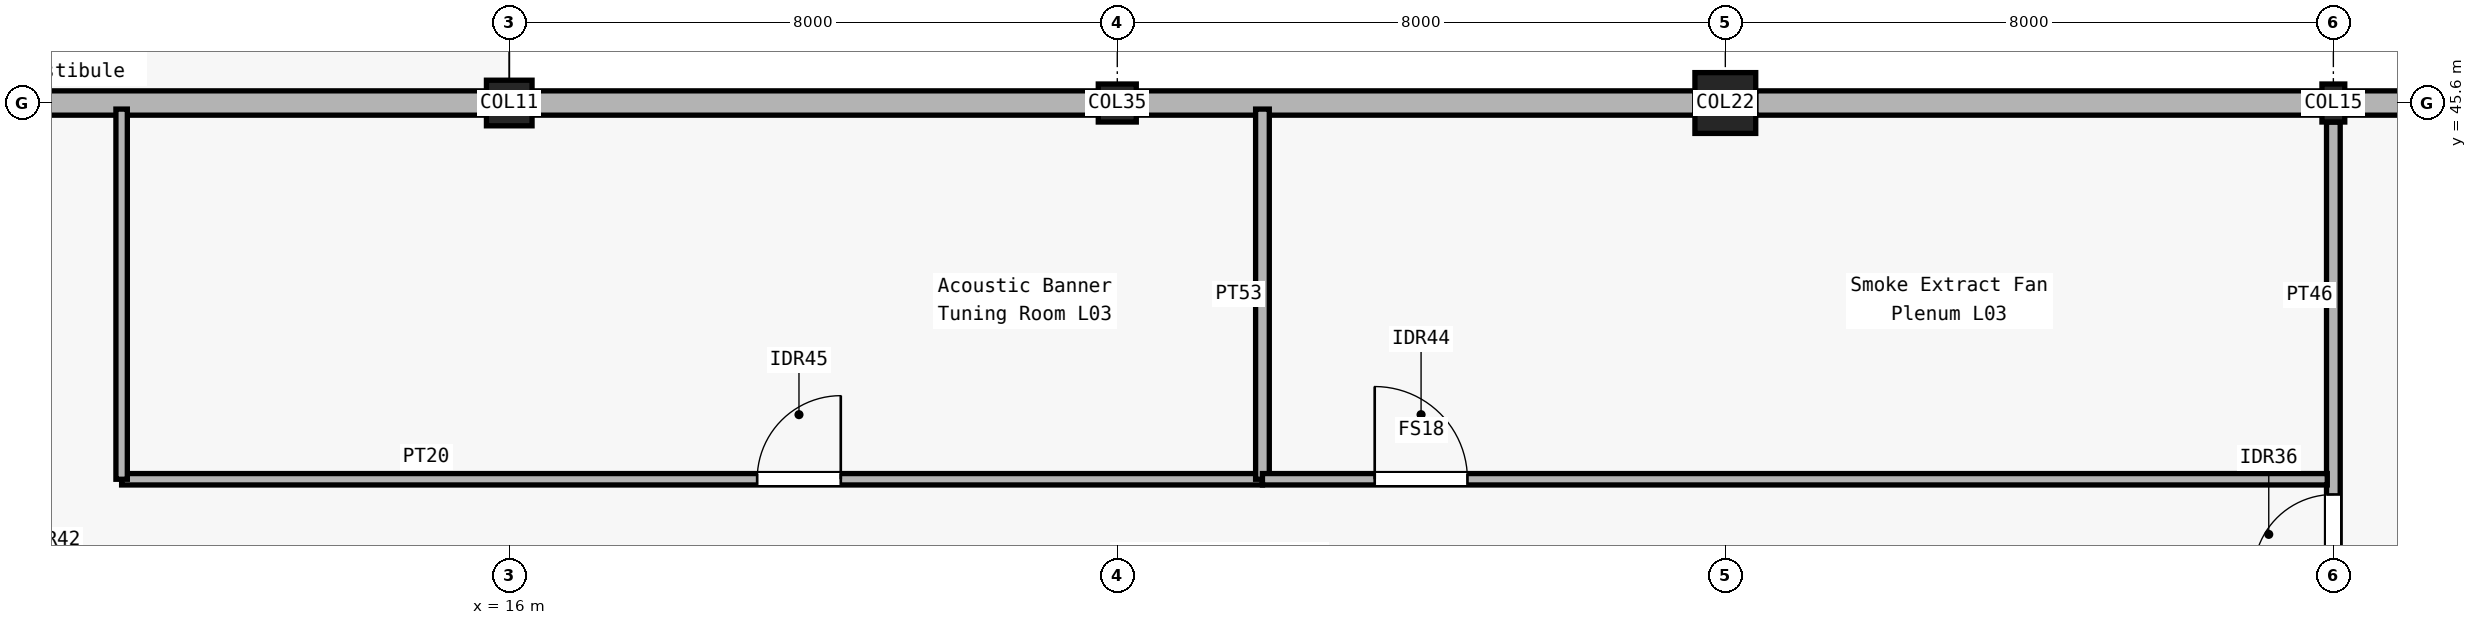
"""IFC4 building model, lengths in metres.
Left out: names, types, materials, properties, quantities, classifications, styles, units other than length and angle.
Written with IfcOpenShell. Run it as: python <this file> out.ifc"""

import sys

from ifc_helpers import new_model, si_unit, direction, frame, frame_2d, origin, origin_2d, place, context, subcontext, project, spatial, rectangle, circle, i_section, extrude, element, fill, save


model = new_model("IFC4")
c1 = context("Model", 3, precision=1e-05, world=origin(), true_north=direction((0.0, 1.0)))
c2 = subcontext(c1, "Body", "Model", "MODEL_VIEW")
j1 = project(units=[si_unit("LENGTHUNIT", "METRE"), si_unit("PLANEANGLEUNIT", "RADIAN")], contexts=[c1])
p1 = place(None, origin())
s1 = spatial("IfcSite", under=j1, at=p1, CompositionType="ELEMENT")
p2 = place(p1, origin())
s2 = spatial("IfcBuilding", under=s1, at=p2, CompositionType="ELEMENT")
p3 = place(p2, frame((0.0, 0.0, 15.0)))
s3 = spatial("IfcBuildingStorey", under=s2, at=p3, CompositionType="ELEMENT", Elevation=15.0)
p4 = place(p3, frame((16.0, 45.6, 0.0), z_axis=(0.0, 0.0, 1.0), x_axis=(1.0, 0.0, 0.0)))
e1 = element("IfcColumn", 1, at=p4, inside=s3, PredefinedType="COLUMN", context=c2, shape_type="SweptSolid", body=[
    extrude(rectangle(XDim=0.6, YDim=0.6, at=origin_2d()), origin(), (0.0, 0.0, 1.0), 4.8),
])
p5 = place(p3, frame((24.0, 45.6, 0.0), z_axis=(0.0, 0.0, 1.0), x_axis=(1.0, 0.0, 0.0)))
e2 = element("IfcColumn", 2, at=p5, inside=s3, PredefinedType="COLUMN", context=c2, shape_type="SweptSolid", body=[
    extrude(rectangle(XDim=0.5, YDim=0.5, at=origin_2d()), origin(), (0.0, 0.0, 1.0), 4.8),
])
p6 = place(p3, frame((32.0, 45.6, 0.0), z_axis=(0.0, 0.0, 1.0), x_axis=(1.0, 0.0, 0.0)))
e3 = element("IfcColumn", 3, at=p6, inside=s3, PredefinedType="COLUMN", context=c2, shape_type="SweptSolid", body=[
    extrude(circle(Radius=0.4, at=origin_2d()), origin(), (0.0, 0.0, 1.0), 4.8),
])
p7 = place(p3, frame((40.0, 45.6, 0.0), z_axis=(0.0, 0.0, 1.0), x_axis=(1.0, 0.0, 0.0)))
e4 = element("IfcColumn", 4, at=p7, inside=s3, PredefinedType="COLUMN", context=c2, shape_type="SweptSolid", body=[
    extrude(i_section(OverallWidth=0.3, OverallDepth=0.5, WebThickness=0.014, FlangeThickness=0.028, FilletRadius=0.027, at=origin_2d()), origin(), (0.0, 0.0, 1.0), 4.8),
])
for number, where, z_axis, x_axis in (
    (5, (8.25, 45.6, 0.0), (0.0, 0.0, 1.0), (1.0, 0.0, 0.0)),
    (6, (16.3, 45.6, 0.0), (0.0, 0.0, 1.0), (1.0, 0.0, 0.0)),
):
    element("IfcWall", number, at=place(p3, frame(where, z_axis=z_axis, x_axis=x_axis)), inside=s3, PredefinedType="SOLIDWALL", context=c2, shape_type="SweptSolid", body=[
        extrude(rectangle(XDim=7.45, YDim=0.32, at=frame_2d((3.725, 0.0))), origin(), (0.0, 0.0, 1.0), 3.87),
    ])
p8 = place(p3, frame((24.25, 45.6, 0.0), z_axis=(0.0, 0.0, 1.0), x_axis=(1.0, 0.0, 0.0)))
e7 = element("IfcWall", 7, at=p8, inside=s3, PredefinedType="SOLIDWALL", context=c2, shape_type="SweptSolid", body=[
    extrude(rectangle(XDim=7.35, YDim=0.32, at=frame_2d((3.675, 0.0))), origin(), (0.0, 0.0, 1.0), 4.02),
])
p9 = place(p3, frame((32.4, 45.6, 0.0), z_axis=(0.0, 0.0, 1.0), x_axis=(1.0, 0.0, 0.0)))
e8 = element("IfcWall", 8, at=p9, inside=s3, PredefinedType="SOLIDWALL", context=c2, shape_type="SweptSolid", body=[
    extrude(rectangle(XDim=7.45, YDim=0.32, at=frame_2d((3.725, 0.0))), origin(), (0.0, 0.0, 1.0), 3.42),
])
p10 = place(p3, frame((40.15, 45.6, 0.0), z_axis=(0.0, 0.0, 1.0), x_axis=(1.0, 0.0, 0.0)))
e9 = element("IfcWall", 9, at=p10, inside=s3, PredefinedType="SOLIDWALL", context=c2, shape_type="SweptSolid", body=[
    extrude(rectangle(XDim=9.3, YDim=0.32, at=frame_2d((4.65, 0.0))), origin(), (0.0, 0.0, 1.0), 3.42),
])
p11 = place(p3, frame((40.0, 38.25, 0.0), z_axis=(0.0, 0.0, 1.0), x_axis=(0.0, 1.0, 0.0)))
e10 = element("IfcWall", 10, at=p11, inside=s3, PredefinedType="PARTITIONING", context=c2, shape_type="SweptSolid", body=[
    extrude(rectangle(XDim=7.1, YDim=0.18, at=frame_2d((3.55, 0.0))), origin(), (0.0, 0.0, 1.0), 3.42),
])
p12 = place(p11, frame((1.15, 0.0, 0.0)))
e11 = element("IfcOpeningElement", 11, at=p12, cuts=e10, PredefinedType="OPENING", context=c2, shape_type="SweptSolid", body=[
    extrude(rectangle(XDim=1.05, YDim=2.1, at=frame_2d((0.525, 1.05))), frame((0.0, 0.1, 0.0), z_axis=(0.0, -1.0, 0.0), x_axis=(1.0, 0.0, 0.0)), (0.0, 0.0, 1.0), 0.2),
])
p13 = place(p3, frame((10.9, 40.65, 0.0), z_axis=(0.0, 0.0, 1.0), x_axis=(1.0, 0.0, 0.0)))
e12 = element("IfcWall", 12, at=p13, inside=s3, PredefinedType="PARTITIONING", context=c2, shape_type="SweptSolid", body=[
    extrude(rectangle(XDim=15.01, YDim=0.15, at=frame_2d((7.505, 0.0))), origin(), (0.0, 0.0, 1.0), 3.83),
])
p14 = place(p13, frame((8.362, 0.0, 0.0)))
e13 = element("IfcOpeningElement", 13, at=p14, cuts=e12, PredefinedType="OPENING", context=c2, shape_type="SweptSolid", body=[
    extrude(rectangle(XDim=1.1, YDim=2.15, at=frame_2d((0.55, 1.075))), frame((0.0, 0.085, 0.0), z_axis=(0.0, -1.0, 0.0), x_axis=(1.0, 0.0, 0.0)), (0.0, 0.0, 1.0), 0.17),
])
p15 = place(p3, frame((25.91, 40.65, 0.0), z_axis=(0.0, 0.0, 1.0), x_axis=(0.0, 1.0, 0.0)))
e14 = element("IfcWall", 14, at=p15, inside=s3, PredefinedType="PARTITIONING", context=c2, shape_type="SweptSolid", body=[
    extrude(rectangle(XDim=4.87, YDim=0.18, at=frame_2d((2.435, 0.0))), origin(), (0.0, 0.0, 1.0), 3.9),
])
p16 = place(p3, frame((25.91, 40.65, 0.0), z_axis=(0.0, 0.0, 1.0), x_axis=(1.0, 0.0, 0.0)))
e15 = element("IfcWall", 15, at=p16, inside=s3, PredefinedType="PARTITIONING", context=c2, shape_type="SweptSolid", body=[
    extrude(rectangle(XDim=14.01, YDim=0.15, at=frame_2d((7.005, 0.0))), origin(), (0.0, 0.0, 1.0), 3.885),
])
p17 = place(p16, frame((1.477, 0.0, 0.0)))
e16 = element("IfcOpeningElement", 16, at=p17, cuts=e15, PredefinedType="OPENING", context=c2, shape_type="SweptSolid", body=[
    extrude(rectangle(XDim=1.22, YDim=2.15, at=frame_2d((0.61, 1.075))), frame((0.0, 0.085, 0.0), z_axis=(0.0, -1.0, 0.0), x_axis=(1.0, 0.0, 0.0)), (0.0, 0.0, 1.0), 0.17),
])
p18 = place(p3, frame((10.9, 40.65, 0.0), z_axis=(0.0, 0.0, 1.0), x_axis=(0.0, 1.0, 0.0)))
e17 = element("IfcWall", 17, at=p18, inside=s3, PredefinedType="PARTITIONING", context=c2, shape_type="SweptSolid", body=[
    extrude(rectangle(XDim=4.87, YDim=0.15, at=frame_2d((2.435, 0.0))), origin(), (0.0, 0.0, 1.0), 3.755),
])
p19 = place(p12, origin())
e18 = element("IfcDoor", 18, at=p19, inside=s3, OperationType="SINGLE_SWING_LEFT", PredefinedType="DOOR", context=c2, shape_type="SweptSolid", body=[
    extrude(rectangle(XDim=1.05, YDim=2.1, at=frame_2d((0.525, 1.05))), frame((0.0, 0.025, 0.0), z_axis=(0.0, -1.0, 0.0), x_axis=(1.0, 0.0, 0.0)), (0.0, 0.0, 1.0), 0.05),
])
fill(e11, e18)
p20 = place(p14, origin())
e19 = element("IfcDoor", 19, at=p20, inside=s3, OperationType="SINGLE_SWING_RIGHT", PredefinedType="DOOR", context=c2, shape_type="SweptSolid", body=[
    extrude(rectangle(XDim=1.1, YDim=2.15, at=frame_2d((0.55, 1.075))), frame((0.0, 0.025, 0.0), z_axis=(0.0, -1.0, 0.0), x_axis=(1.0, 0.0, 0.0)), (0.0, 0.0, 1.0), 0.05),
])
fill(e13, e19)
p21 = place(p17, origin())
e20 = element("IfcDoor", 20, at=p21, inside=s3, OperationType="SINGLE_SWING_LEFT", PredefinedType="DOOR", context=c2, shape_type="SweptSolid", body=[
    extrude(rectangle(XDim=1.22, YDim=2.15, at=frame_2d((0.61, 1.075))), frame((0.0, 0.025, 0.0), z_axis=(0.0, -1.0, 0.0), x_axis=(1.0, 0.0, 0.0)), (0.0, 0.0, 1.0), 0.05),
])
fill(e16, e20)
save(model, sys.argv[1])
